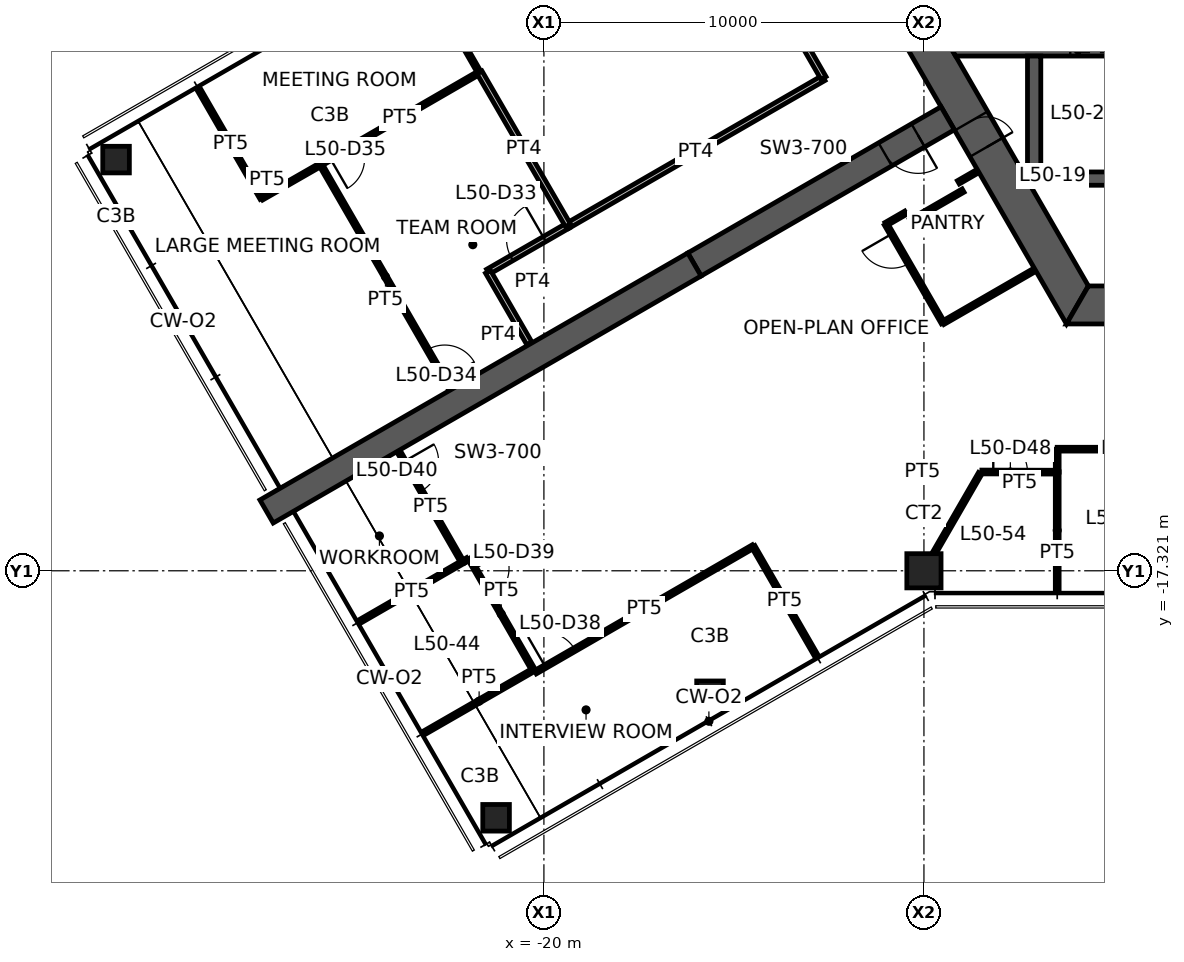
"""IFC4 building model, lengths in metres.
Left out: names, types, materials, properties, quantities, classifications, styles, units other than length and angle.
Written with IfcOpenShell. Run it as: python <this file> out.ifc"""

import sys

from ifc_helpers import new_model, si_unit, direction, frame, frame_2d, origin, origin_2d, place, context, subcontext, project, spatial, polyline, rectangle, hollow_rectangle, outline, extrude, element, fill, save


model = new_model("IFC4")
c1 = context("Model", 3, precision=1e-05, world=origin(), true_north=direction((0.0, 1.0)))
c2 = subcontext(c1, "Body", "Model", "MODEL_VIEW")
j1 = project(units=[si_unit("LENGTHUNIT", "METRE"), si_unit("PLANEANGLEUNIT", "RADIAN")], contexts=[c1])
p1 = place(None, origin())
s1 = spatial("IfcSite", under=j1, at=p1, CompositionType="ELEMENT")
p2 = place(p1, origin())
s2 = spatial("IfcBuilding", under=s1, at=p2, CompositionType="ELEMENT")
p3 = place(p2, frame((0.0, 0.0, 199.4)))
s3 = spatial("IfcBuildingStorey", under=s2, at=p3, CompositionType="ELEMENT", Elevation=199.4)
p4 = place(p3, frame((-10.0, -17.321, 0.0), z_axis=(0.0, 0.0, 1.0), x_axis=(1.0, 0.0, 0.0)))
e1 = element("IfcColumn", 1, at=p4, inside=s3, PredefinedType="COLUMN", context=c2, shape_type="SweptSolid", body=[
    extrude(hollow_rectangle(XDim=0.9, YDim=0.9, WallThickness=0.09, at=origin_2d()), origin(), (0.0, 0.0, 1.0), 3.9),
])
for number, where, z_axis, x_axis in (
    (2, (-31.258, -6.5, 0.0), (0.0, 0.0, 1.0), (1.0, 0.0, 0.0)),
    (3, (-15.629, -20.571, 0.0), (0.0, 0.0, 1.0), (1.0, 0.0, 0.0)),
    (4, (-21.258, -23.821, 0.0), (0.0, 0.0, 1.0), (1.0, 0.0, 0.0)),
):
    element("IfcColumn", number, at=place(p3, frame(where, z_axis=z_axis, x_axis=x_axis)), inside=s3, PredefinedType="COLUMN", context=c2, shape_type="SweptSolid", body=[
        extrude(hollow_rectangle(XDim=0.7, YDim=0.7, WallThickness=0.036, at=origin_2d()), origin(), (0.0, 0.0, 1.0), 3.9),
    ])
p5 = place(p3, frame((-11.922, 0.0, 0.0), z_axis=(0.0, 0.0, 1.0), x_axis=(0.500004296715, -0.866022923061, 0.0)))
e5 = element("IfcWall", 5, at=p5, inside=s3, PredefinedType="SHEAR", context=c2, shape_type="SweptSolid", body=[
    extrude(outline(polyline([(-0.289, -0.5), (6.331, -0.5), (7.131, -0.5), (12.211, -0.5), (11.634, 0.5), (7.131, 0.5), (6.331, 0.5), (0.289, 0.5), (-0.289, -0.5)])), origin(), (0.0, 0.0, 1.0), 3.9),
])
p6 = place(p5, frame((6.331, 0.0, 0.0)))
e6 = element("IfcOpeningElement", 6, at=p6, cuts=e5, PredefinedType="OPENING", context=c2, shape_type="SweptSolid", body=[
    extrude(rectangle(XDim=0.8, YDim=2.1, at=frame_2d((0.4, 1.05))), frame((0.0, 0.51, 0.0), z_axis=(0.0, -1.0, 0.0), x_axis=(1.0, 0.0, 0.0)), (0.0, 0.0, 1.0), 1.02),
])
p7 = place(p3, frame((-5.961, -10.325, 0.0), z_axis=(0.0, 0.0, 1.0), x_axis=(1.0, 0.0, 0.0)))
e7 = element("IfcWall", 7, at=p7, inside=s3, PredefinedType="SHEAR", context=c2, shape_type="SweptSolid", body=[
    extrude(outline(polyline([(-0.289, -0.5), (5.461, -0.5), (6.461, -0.5), (12.211, -0.5), (11.634, 0.5), (6.461, 0.5), (5.461, 0.5), (0.289, 0.5), (-0.289, -0.5)])), origin(), (0.0, 0.0, 1.0), 3.9),
])
p8 = place(p7, frame((5.461, 0.0, 0.0)))
e8 = element("IfcOpeningElement", 8, at=p8, cuts=e7, PredefinedType="OPENING", context=c2, shape_type="SweptSolid", body=[
    extrude(rectangle(XDim=1.0, YDim=2.1, at=frame_2d((0.5, 1.05))), frame((0.0, 0.51, 0.0), z_axis=(0.0, -1.0, 0.0), x_axis=(1.0, 0.0, 0.0)), (0.0, 0.0, 1.0), 1.02),
])
p9 = place(p3, frame((-9.375, -5.413, 0.0), z_axis=(0.0, 0.0, 1.0), x_axis=(-0.866032377459, -0.499987921047, 0.0)))
e9 = element("IfcWall", 9, at=p9, inside=s3, PredefinedType="SHEAR", context=c2, shape_type="SweptSolid", body=[
    extrude(rectangle(XDim=7.696, YDim=0.7, at=frame_2d((3.848, 0.0))), origin(), (0.0, 0.0, 1.0), 3.9),
])
p10 = place(p9, frame((0.9, 0.0, 0.0)))
e10 = element("IfcOpeningElement", 10, at=p10, cuts=e9, PredefinedType="OPENING", context=c2, shape_type="SweptSolid", body=[
    extrude(rectangle(XDim=1.0, YDim=2.1, at=frame_2d((0.5, 1.05))), frame((0.0, 0.36, 0.0), z_axis=(0.0, -1.0, 0.0), x_axis=(1.0, 0.0, 0.0)), (0.0, 0.0, 1.0), 0.72),
])
p11 = place(p3, frame((-16.039, -9.26, 0.0), z_axis=(0.0, 0.0, 1.0), x_axis=(-0.866024837091, -0.50000098154, 0.0)))
e11 = element("IfcWall", 11, at=p11, inside=s3, PredefinedType="SHEAR", context=c2, shape_type="SweptSolid", body=[
    extrude(rectangle(XDim=13.0, YDim=0.7, at=frame_2d((6.5, 0.0))), origin(), (0.0, 0.0, 1.0), 3.9),
])
p12 = place(p3, frame((-9.266, -3.6, 0.0), z_axis=(0.0, 0.0, 1.0), x_axis=(1.0, 0.0, 0.0)))
e12 = element("IfcWall", 12, at=p12, inside=s3, PredefinedType="SHEAR", context=c2, shape_type="SweptSolid", body=[
    extrude(outline(polyline([(0.101, -0.175), (3.116, -0.175), (4.417, -0.175), (5.667, -0.175), (6.767, -0.175), (7.841, -0.175), (7.841, 0.175), (6.767, 0.175), (5.667, 0.175), (4.417, 0.175), (3.116, 0.175), (-0.101, 0.175), (0.101, -0.175)])), origin(), (0.0, 0.0, 1.0), 3.9),
])
p13 = place(p12, frame((5.667, 0.0, 0.0)))
e13 = element("IfcOpeningElement", 13, at=p13, cuts=e12, PredefinedType="OPENING", context=c2, shape_type="SweptSolid", body=[
    extrude(rectangle(XDim=1.1, YDim=2.1, at=frame_2d((0.55, 1.05))), frame((0.0, 0.185, 0.0), z_axis=(0.0, -1.0, 0.0), x_axis=(1.0, 0.0, 0.0)), (0.0, 0.0, 1.0), 0.37),
])
p14 = place(p12, frame((3.116, 0.0, 0.0)))
e14 = element("IfcOpeningElement", 14, at=p14, cuts=e12, PredefinedType="OPENING", context=c2, shape_type="SweptSolid", body=[
    extrude(rectangle(XDim=1.3, YDim=2.1, at=frame_2d((0.65, 1.05))), frame((0.0, 0.185, 0.0), z_axis=(0.0, -1.0, 0.0), x_axis=(1.0, 0.0, 0.0)), (0.0, 0.0, 1.0), 0.37),
])
p15 = place(p3, frame((-6.925, -7.0, 0.0), z_axis=(0.0, 0.0, 1.0), x_axis=(1.0, 0.0, 0.0)))
e15 = element("IfcWall", 15, at=p15, inside=s3, PredefinedType="SHEAR", context=c2, shape_type="SweptSolid", body=[
    extrude(rectangle(XDim=2.25, YDim=0.35, at=frame_2d((1.125, 0.0))), origin(), (0.0, 0.0, 1.0), 3.9),
])
p16 = place(p3, frame((-7.1, -3.775, 0.0), z_axis=(0.0, 0.0, 1.0), x_axis=(0.0, -1.0, 0.0)))
e16 = element("IfcWall", 16, at=p16, inside=s3, PredefinedType="SHEAR", context=c2, shape_type="SweptSolid", body=[
    extrude(outline(polyline([(0.0, -0.175), (3.274, -0.175), (3.4, 0.0), (3.4, 0.175), (0.0, 0.175), (0.0, -0.175)])), origin(), (0.0, 0.0, 1.0), 3.9),
])
p17 = place(p3, frame((-19.372, -8.24, 0.0), z_axis=(0.0, 0.0, 1.0), x_axis=(0.866015031168, 0.500017965468, 0.0)))
e17 = element("IfcWall", 17, at=p17, inside=s3, PredefinedType="PARTITIONING", context=c2, shape_type="SweptSolid", body=[
    extrude(rectangle(XDim=7.771, YDim=0.15, at=frame_2d((3.886, 0.0))), origin(), (0.0, 0.0, 1.0), 2.35),
])
p18 = place(p3, frame((-12.642, -4.354, 0.0), z_axis=(0.0, 0.0, 1.0), x_axis=(-0.500019495363, 0.866014147839, 0.0)))
e18 = element("IfcWall", 18, at=p18, inside=s3, PredefinedType="PARTITIONING", context=c2, shape_type="SweptSolid", body=[
    extrude(rectangle(XDim=5.028, YDim=0.15, at=frame_2d((2.514, 0.0))), origin(), (0.0, 0.0, 1.0), 2.35),
])
p19 = place(p3, frame((-21.471, -9.452, 0.0), z_axis=(0.0, 0.0, 1.0), x_axis=(0.866025270247, 0.500000231294, 0.0)))
e19 = element("IfcWall", 19, at=p19, inside=s3, PredefinedType="PARTITIONING", context=c2, shape_type="SweptSolid", body=[
    extrude(rectangle(XDim=2.435, YDim=0.15, at=frame_2d((1.217, 0.0))), origin(), (0.0, 0.0, 1.0), 2.35),
])
p20 = place(p19, frame((0.717, 0.0, 0.0)))
e20 = element("IfcOpeningElement", 20, at=p20, cuts=e19, PredefinedType="OPENING", context=c2, shape_type="SweptSolid", body=[
    extrude(rectangle(XDim=1.0, YDim=2.1, at=frame_2d((0.5, 1.05))), frame((0.0, 0.085, 0.0), z_axis=(0.0, -1.0, 0.0), x_axis=(1.0, 0.0, 0.0)), (0.0, 0.0, 1.0), 0.17),
])
p21 = place(p3, frame((-20.381, -11.34, 0.0), z_axis=(0.0, 0.0, 1.0), x_axis=(-0.500029427677, 0.866008413041, 0.0)))
e21 = element("IfcWall", 21, at=p21, inside=s3, PredefinedType="PARTITIONING", context=c2, shape_type="SweptSolid", body=[
    extrude(rectangle(XDim=2.18, YDim=0.15, at=frame_2d((1.09, 0.0))), origin(), (0.0, 0.0, 1.0), 2.35),
])
p22 = place(p3, frame((-29.065, -4.68, 0.0), z_axis=(0.0, 0.0, 1.0), x_axis=(0.500061797536, -0.86598972202, 0.0)))
e22 = element("IfcWall", 22, at=p22, inside=s3, PredefinedType="PARTITIONING", context=c2, shape_type="SweptSolid", body=[
    extrude(rectangle(XDim=3.28, YDim=0.1, at=frame_2d((1.64, 0.0))), origin(), (0.0, 0.0, 1.0), 2.35),
])
p23 = place(p3, frame((-27.425, -7.52, 0.0), z_axis=(0.0, 0.0, 1.0), x_axis=(0.867394737581, 0.497620708188, 0.0)))
e23 = element("IfcWall", 23, at=p23, inside=s3, PredefinedType="PARTITIONING", context=c2, shape_type="SweptSolid", body=[
    extrude(rectangle(XDim=1.791, YDim=0.1, at=frame_2d((0.896, 0.0))), origin(), (0.0, 0.0, 1.0), 2.35),
])
p24 = place(p3, frame((-25.878, -6.627, 0.0), z_axis=(0.0, 0.0, 1.0), x_axis=(0.500502111965, -0.865735315162, 0.0)))
e24 = element("IfcWall", 24, at=p24, inside=s3, PredefinedType="PARTITIONING", context=c2, shape_type="SweptSolid", body=[
    extrude(rectangle(XDim=6.83, YDim=0.1, at=frame_2d((3.415, 0.0))), origin(), (0.0, 0.0, 1.0), 2.35),
])
p25 = place(p24, frame((5.63, 0.0, 0.0)))
e25 = element("IfcOpeningElement", 25, at=p25, cuts=e24, PredefinedType="OPENING", context=c2, shape_type="SweptSolid", body=[
    extrude(rectangle(XDim=0.9, YDim=2.1, at=frame_2d((0.45, 1.05))), frame((0.0, 0.06, 0.0), z_axis=(0.0, -1.0, 0.0), x_axis=(1.0, 0.0, 0.0)), (0.0, 0.0, 1.0), 0.12),
])
p26 = place(p3, frame((-23.332, -1.37, 0.0), z_axis=(0.0, 0.0, 1.0), x_axis=(0.498789948492, -0.866722901095, 0.0)))
e26 = element("IfcWall", 26, at=p26, inside=s3, PredefinedType="PARTITIONING", context=c2, shape_type="SweptSolid", body=[
    extrude(rectangle(XDim=3.28, YDim=0.1, at=frame_2d((1.64, 0.0))), origin(), (0.0, 0.0, 1.0), 2.35),
])
p27 = place(p3, frame((-21.695, -4.206, 0.0), z_axis=(0.0, 0.0, 1.0), x_axis=(-0.865554211136, -0.500815242963, 0.0)))
e27 = element("IfcWall", 27, at=p27, inside=s3, PredefinedType="PARTITIONING", context=c2, shape_type="SweptSolid", body=[
    extrude(rectangle(XDim=4.833, YDim=0.1, at=frame_2d((2.417, 0.0))), origin(), (0.0, 0.0, 1.0), 2.35),
])
p28 = place(p27, frame((3.633, 0.0, 0.0)))
e28 = element("IfcOpeningElement", 28, at=p28, cuts=e27, PredefinedType="OPENING", context=c2, shape_type="SweptSolid", body=[
    extrude(rectangle(XDim=0.9, YDim=2.1, at=frame_2d((0.45, 1.05))), frame((0.0, 0.06, 0.0), z_axis=(0.0, -1.0, 0.0), x_axis=(1.0, 0.0, 0.0)), (0.0, 0.0, 1.0), 0.12),
])
p29 = place(p3, frame((-19.363, -8.234, 0.0), z_axis=(0.0, 0.0, 1.0), x_axis=(-0.500877035324, 0.865518454734, 0.0)))
e29 = element("IfcWall", 29, at=p29, inside=s3, PredefinedType="PARTITIONING", context=c2, shape_type="SweptSolid", body=[
    extrude(rectangle(XDim=4.654, YDim=0.15, at=frame_2d((2.327, 0.0))), origin(), (0.0, 0.0, 1.0), 2.35),
])
p30 = place(p3, frame((-11.0, -8.198, 0.0), z_axis=(0.0, 0.0, 1.0), x_axis=(0.866131372301, 0.499816412211, 0.0)))
e30 = element("IfcWall", 30, at=p30, inside=s3, PredefinedType="PARTITIONING", context=c2, shape_type="SweptSolid", body=[
    extrude(rectangle(XDim=0.6, YDim=0.1, at=frame_2d((0.3, 0.0))), origin(), (0.0, 0.0, 1.0), 2.35),
])
p31 = place(p3, frame((-10.355, -8.115, 0.0), z_axis=(0.0, 0.0, 1.0), x_axis=(0.866094119867, 0.499880961361, 0.0)))
e31 = element("IfcWall", 31, at=p31, inside=s3, PredefinedType="PARTITIONING", context=c2, shape_type="SweptSolid", body=[
    extrude(rectangle(XDim=1.6, YDim=0.1, at=frame_2d((0.8, 0.0))), origin(), (0.0, 0.0, 1.0), 2.35),
])
p32 = place(p3, frame((-9.5, -10.796, 0.0), z_axis=(0.0, 0.0, 1.0), x_axis=(-0.499990139034, 0.866031096941, 0.0)))
e32 = element("IfcWall", 32, at=p32, inside=s3, PredefinedType="PARTITIONING", context=c2, shape_type="SweptSolid", body=[
    extrude(rectangle(XDim=3.0, YDim=0.1, at=frame_2d((1.5, 0.0))), origin(), (0.0, 0.0, 1.0), 2.35),
])
p33 = place(p32, frame((1.8, 0.0, 0.0)))
e33 = element("IfcOpeningElement", 33, at=p33, cuts=e32, PredefinedType="OPENING", context=c2, shape_type="SweptSolid", body=[
    extrude(rectangle(XDim=0.9, YDim=2.1, at=frame_2d((0.45, 1.05))), frame((0.0, 0.06, 0.0), z_axis=(0.0, -1.0, 0.0), x_axis=(1.0, 0.0, 0.0)), (0.0, 0.0, 1.0), 0.12),
])
p34 = place(p3, frame((-9.094, -7.098, 0.0), z_axis=(0.0, 0.0, 1.0), x_axis=(0.865954211699, 0.50012328804, 0.0)))
e34 = element("IfcWall", 34, at=p34, inside=s3, PredefinedType="PARTITIONING", context=c2, shape_type="SweptSolid", body=[
    extrude(rectangle(XDim=0.58, YDim=0.1, at=frame_2d((0.29, 0.0))), origin(), (0.0, 0.0, 1.0), 2.35),
])
p35 = place(p3, frame((-7.092, -9.406, 0.0), z_axis=(0.0, 0.0, 1.0), x_axis=(-0.86603494908, -0.499983466698, 0.0)))
e35 = element("IfcWall", 35, at=p35, inside=s3, PredefinedType="PARTITIONING", context=c2, shape_type="SweptSolid", body=[
    extrude(rectangle(XDim=2.78, YDim=0.1, at=frame_2d((1.39, 0.0))), origin(), (0.0, 0.0, 1.0), 2.35),
])
p36 = place(p3, frame((-23.137, -21.576, 0.0), z_axis=(0.0, 0.0, 1.0), x_axis=(0.866702770653, 0.498824926544, 0.0)))
e36 = element("IfcWall", 36, at=p36, inside=s3, PredefinedType="PARTITIONING", context=c2, shape_type="SweptSolid", body=[
    extrude(rectangle(XDim=3.306, YDim=0.1, at=frame_2d((1.653, 0.0))), origin(), (0.0, 0.0, 1.0), 2.35),
])
p37 = place(p3, frame((-20.225, -19.991, 0.0), z_axis=(0.0, 0.0, 1.0), x_axis=(0.866030817826, 0.499990622488, 0.0)))
e37 = element("IfcWall", 37, at=p37, inside=s3, PredefinedType="PARTITIONING", context=c2, shape_type="SweptSolid", body=[
    extrude(rectangle(XDim=6.62, YDim=0.1, at=frame_2d((3.31, 0.0))), origin(), (0.0, 0.0, 1.0), 2.35),
])
p38 = place(p37, frame((0.3, 0.0, 0.0)))
e38 = element("IfcOpeningElement", 38, at=p38, cuts=e37, PredefinedType="OPENING", context=c2, shape_type="SweptSolid", body=[
    extrude(rectangle(XDim=0.9, YDim=2.1, at=frame_2d((0.45, 1.05))), frame((0.0, 0.06, 0.0), z_axis=(0.0, -1.0, 0.0), x_axis=(1.0, 0.0, 0.0)), (0.0, 0.0, 1.0), 0.12),
])
p39 = place(p3, frame((-14.492, -16.681, 0.0), z_axis=(0.0, 0.0, 1.0), x_axis=(0.500008057651, -0.866020751647, 0.0)))
e39 = element("IfcWall", 39, at=p39, inside=s3, PredefinedType="PARTITIONING", context=c2, shape_type="SweptSolid", body=[
    extrude(rectangle(XDim=3.305, YDim=0.1, at=frame_2d((1.653, 0.0))), origin(), (0.0, 0.0, 1.0), 2.35),
])
p40 = place(p3, frame((-24.829, -18.646, 0.0), z_axis=(0.0, 0.0, 1.0), x_axis=(0.866002566612, 0.500039553057, 0.0)))
e40 = element("IfcWall", 40, at=p40, inside=s3, PredefinedType="PARTITIONING", context=c2, shape_type="SweptSolid", body=[
    extrude(rectangle(XDim=3.11, YDim=0.1, at=frame_2d((1.555, 0.0))), origin(), (0.0, 0.0, 1.0), 2.35),
])
p41 = place(p3, frame((-21.967, -16.993, 0.0), z_axis=(0.0, 0.0, 1.0), x_axis=(0.498972655929, -0.866617729241, 0.0)))
e41 = element("IfcWall", 41, at=p41, inside=s3, PredefinedType="PARTITIONING", context=c2, shape_type="SweptSolid", body=[
    extrude(rectangle(XDim=3.383, YDim=0.1, at=frame_2d((1.692, 0.0))), origin(), (0.0, 0.0, 1.0), 2.35),
])
p42 = place(p41, frame((0.3, 0.0, 0.0)))
e42 = element("IfcOpeningElement", 42, at=p42, cuts=e41, PredefinedType="OPENING", context=c2, shape_type="SweptSolid", body=[
    extrude(rectangle(XDim=0.9, YDim=2.1, at=frame_2d((0.45, 1.05))), frame((0.0, 0.06, 0.0), z_axis=(0.0, -1.0, 0.0), x_axis=(1.0, 0.0, 0.0)), (0.0, 0.0, 1.0), 0.12),
])
p43 = place(p3, frame((-23.822, -14.181, 0.0), z_axis=(0.0, 0.0, 1.0), x_axis=(0.498880193261, -0.866670959922, 0.0)))
e43 = element("IfcWall", 43, at=p43, inside=s3, PredefinedType="PARTITIONING", context=c2, shape_type="SweptSolid", body=[
    extrude(rectangle(XDim=3.364, YDim=0.1, at=frame_2d((1.682, 0.0))), origin(), (0.0, 0.0, 1.0), 2.35),
])
p44 = place(p43, frame((0.3, 0.0, 0.0)))
e44 = element("IfcOpeningElement", 44, at=p44, cuts=e43, PredefinedType="OPENING", context=c2, shape_type="SweptSolid", body=[
    extrude(rectangle(XDim=0.9, YDim=2.1, at=frame_2d((0.45, 1.05))), frame((0.0, 0.06, 0.0), z_axis=(0.0, -1.0, 0.0), x_axis=(1.0, 0.0, 0.0)), (0.0, 0.0, 1.0), 0.12),
])
p45 = place(p3, frame((-6.493, -17.801, 0.0), z_axis=(0.0, 0.0, 1.0), x_axis=(0.0, 1.0, 0.0)))
e45 = element("IfcWall", 45, at=p45, inside=s3, PredefinedType="PARTITIONING", context=c2, shape_type="SweptSolid", body=[
    extrude(rectangle(XDim=3.085, YDim=0.1, at=frame_2d((1.542, 0.0))), origin(), (0.0, 0.0, 1.0), 2.35),
])
p46 = place(p3, frame((-6.493, -14.725, 0.0), z_axis=(0.0, 0.0, 1.0), x_axis=(0.0, 1.0, 0.0)))
e46 = element("IfcWall", 46, at=p46, inside=s3, PredefinedType="PARTITIONING", context=c2, shape_type="SweptSolid", body=[
    extrude(rectangle(XDim=0.604, YDim=0.1, at=frame_2d((0.302, 0.0))), origin(), (0.0, 0.0, 1.0), 2.35),
])
p47 = place(p3, frame((-6.493, -14.121, 0.0), z_axis=(0.0, 0.0, 1.0), x_axis=(1.0, 0.0, 0.0)))
e47 = element("IfcWall", 47, at=p47, inside=s3, PredefinedType="PARTITIONING", context=c2, shape_type="SweptSolid", body=[
    extrude(rectangle(XDim=3.247, YDim=0.1, at=frame_2d((1.623, 0.0))), origin(), (0.0, 0.0, 1.0), 2.35),
])
p48 = place(p3, frame((-8.476, -14.72, 0.0), z_axis=(0.0, 0.0, 1.0), x_axis=(0.99999726379, -0.002339318888, 0.0)))
e48 = element("IfcWall", 48, at=p48, inside=s3, PredefinedType="PARTITIONING", context=c2, shape_type="SweptSolid", body=[
    extrude(rectangle(XDim=1.983, YDim=0.1, at=frame_2d((0.991, 0.0))), origin(), (0.0, 0.0, 1.0), 2.35),
])
p49 = place(p48, frame((0.3, 0.0, 0.0)))
e49 = element("IfcOpeningElement", 49, at=p49, cuts=e48, PredefinedType="OPENING", context=c2, shape_type="SweptSolid", body=[
    extrude(rectangle(XDim=0.9, YDim=2.1, at=frame_2d((0.45, 1.05))), frame((0.0, 0.06, 0.0), z_axis=(0.0, -1.0, 0.0), x_axis=(1.0, 0.0, 0.0)), (0.0, 0.0, 1.0), 0.12),
])
p50 = place(p3, frame((-22.01, -17.018, 0.0), z_axis=(0.0, 0.0, 1.0), x_axis=(-0.866224454185, -0.499655075999, 0.0)))
e50 = element("IfcWall", 50, at=p50, inside=s3, PredefinedType="PARTITIONING", context=c2, shape_type="SweptSolid", body=[
    extrude(rectangle(XDim=0.104, YDim=0.1, at=frame_2d((0.052, 0.0))), origin(), (0.0, 0.0, 1.0), 2.35),
])
p51 = place(p3, frame((-9.759, -16.904, 0.0), z_axis=(0.0, 0.0, 1.0), x_axis=(0.500049399443, 0.865996881124, 0.0)))
e51 = element("IfcWall", 51, at=p51, inside=s3, PredefinedType="PARTITIONING", context=c2, shape_type="SweptSolid", body=[
    extrude(rectangle(XDim=2.478, YDim=0.1, at=frame_2d((1.239, 0.0))), origin(), (0.0, 0.0, 1.0), 2.35),
])
p52 = place(p6, origin())
e52 = element("IfcDoor", 52, at=p52, inside=s3, OperationType="SINGLE_SWING_RIGHT", PredefinedType="DOOR", context=c2, shape_type="SweptSolid", body=[
    extrude(rectangle(XDim=0.8, YDim=2.1, at=frame_2d((0.4, 1.05))), frame((0.0, 0.025, 0.0), z_axis=(0.0, -1.0, 0.0), x_axis=(1.0, 0.0, 0.0)), (0.0, 0.0, 1.0), 0.05),
])
fill(e6, e52)
p53 = place(p10, origin())
e53 = element("IfcDoor", 53, at=p53, inside=s3, OperationType="SINGLE_SWING_LEFT", PredefinedType="DOOR", context=c2, shape_type="SweptSolid", body=[
    extrude(rectangle(XDim=1.0, YDim=2.1, at=frame_2d((0.5, 1.05))), frame((0.0, 0.025, 0.0), z_axis=(0.0, -1.0, 0.0), x_axis=(1.0, 0.0, 0.0)), (0.0, 0.0, 1.0), 0.05),
])
fill(e10, e53)
p54 = place(p20, origin())
e54 = element("IfcDoor", 54, at=p54, inside=s3, OperationType="SINGLE_SWING_RIGHT", PredefinedType="DOOR", context=c2, shape_type="SweptSolid", body=[
    extrude(rectangle(XDim=1.0, YDim=2.1, at=frame_2d((0.5, 1.05))), frame((0.0, 0.025, 0.0), z_axis=(0.0, -1.0, 0.0), x_axis=(1.0, 0.0, 0.0)), (0.0, 0.0, 1.0), 0.05),
])
fill(e20, e54)
p55 = place(p25, origin())
e55 = element("IfcDoor", 55, at=p55, inside=s3, OperationType="SINGLE_SWING_RIGHT", PredefinedType="DOOR", context=c2, shape_type="SweptSolid", body=[
    extrude(rectangle(XDim=0.9, YDim=2.1, at=frame_2d((0.45, 1.05))), frame((0.0, 0.025, 0.0), z_axis=(0.0, -1.0, 0.0), x_axis=(1.0, 0.0, 0.0)), (0.0, 0.0, 1.0), 0.05),
])
fill(e25, e55)
p56 = place(p28, origin())
e56 = element("IfcDoor", 56, at=p56, inside=s3, OperationType="SINGLE_SWING_RIGHT", PredefinedType="DOOR", context=c2, shape_type="SweptSolid", body=[
    extrude(rectangle(XDim=0.9, YDim=2.1, at=frame_2d((0.45, 1.05))), frame((0.0, 0.025, 0.0), z_axis=(0.0, -1.0, 0.0), x_axis=(1.0, 0.0, 0.0)), (0.0, 0.0, 1.0), 0.05),
])
fill(e28, e56)
p57 = place(p33, origin())
e57 = element("IfcDoor", 57, at=p57, inside=s3, OperationType="SINGLE_SWING_RIGHT", PredefinedType="DOOR", context=c2, shape_type="SweptSolid", body=[
    extrude(rectangle(XDim=0.9, YDim=2.1, at=frame_2d((0.45, 1.05))), frame((0.0, 0.025, 0.0), z_axis=(0.0, -1.0, 0.0), x_axis=(1.0, 0.0, 0.0)), (0.0, 0.0, 1.0), 0.05),
])
fill(e33, e57)
p58 = place(p38, origin())
e58 = element("IfcDoor", 58, at=p58, inside=s3, OperationType="SINGLE_SWING_LEFT", PredefinedType="DOOR", context=c2, shape_type="SweptSolid", body=[
    extrude(rectangle(XDim=0.9, YDim=2.1, at=frame_2d((0.45, 1.05))), frame((0.0, 0.025, 0.0), z_axis=(0.0, -1.0, 0.0), x_axis=(1.0, 0.0, 0.0)), (0.0, 0.0, 1.0), 0.05),
])
fill(e38, e58)
p59 = place(p42, origin())
e59 = element("IfcDoor", 59, at=p59, inside=s3, OperationType="SINGLE_SWING_LEFT", PredefinedType="DOOR", context=c2, shape_type="SweptSolid", body=[
    extrude(rectangle(XDim=0.9, YDim=2.1, at=frame_2d((0.45, 1.05))), frame((0.0, 0.025, 0.0), z_axis=(0.0, -1.0, 0.0), x_axis=(1.0, 0.0, 0.0)), (0.0, 0.0, 1.0), 0.05),
])
fill(e42, e59)
p60 = place(p44, origin())
e60 = element("IfcDoor", 60, at=p60, inside=s3, OperationType="SINGLE_SWING_LEFT", PredefinedType="DOOR", context=c2, shape_type="SweptSolid", body=[
    extrude(rectangle(XDim=0.9, YDim=2.1, at=frame_2d((0.45, 1.05))), frame((0.0, 0.025, 0.0), z_axis=(0.0, -1.0, 0.0), x_axis=(1.0, 0.0, 0.0)), (0.0, 0.0, 1.0), 0.05),
])
fill(e44, e60)
p61 = place(p49, origin())
e61 = element("IfcDoor", 61, at=p61, inside=s3, OperationType="SINGLE_SWING_LEFT", PredefinedType="DOOR", context=c2, shape_type="SweptSolid", body=[
    extrude(rectangle(XDim=0.9, YDim=2.1, at=frame_2d((0.45, 1.05))), frame((0.0, 0.025, 0.0), z_axis=(0.0, -1.0, 0.0), x_axis=(1.0, 0.0, 0.0)), (0.0, 0.0, 1.0), 0.05),
])
fill(e49, e61)
save(model, sys.argv[1])
